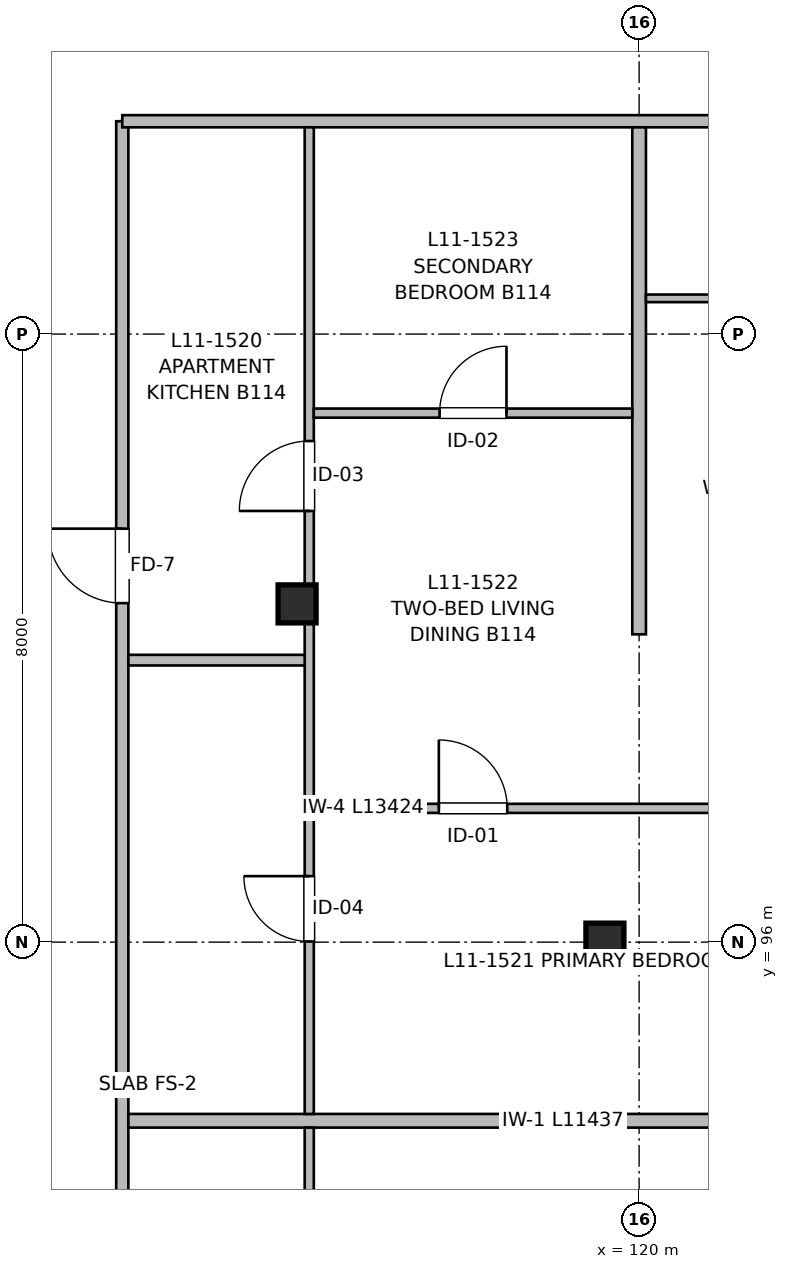
"""IFC4 building model, lengths in metres.
Left out: names, types, materials, properties, quantities, classifications, styles, units other than length and angle.
Written with IfcOpenShell. Run it as: python <this file> out.ifc"""

import sys

from ifc_helpers import new_model, si_unit, direction, frame, frame_2d, origin, origin_2d, place, context, subcontext, project, spatial, rectangle, extrude, element, fill, save


model = new_model("IFC4")
c1 = context("Model", 3, precision=1e-05, world=origin(), true_north=direction((0.0, 1.0)))
c2 = subcontext(c1, "Body", "Model", "MODEL_VIEW")
j1 = project(units=[si_unit("LENGTHUNIT", "METRE"), si_unit("PLANEANGLEUNIT", "RADIAN")], contexts=[c1])
p1 = place(None, origin())
s1 = spatial("IfcSite", under=j1, at=p1, CompositionType="ELEMENT")
p2 = place(p1, origin())
s2 = spatial("IfcBuilding", under=s1, at=p2, CompositionType="ELEMENT")
p3 = place(p2, frame((0.0, 0.0, 36.16)))
s3 = spatial("IfcBuildingStorey", under=s2, at=p3, CompositionType="ELEMENT", Elevation=36.16)
for number, where, z_axis, x_axis in (
    (1, (115.5, 100.45, 0.0), (0.0, 0.0, 1.0), (1.0, 0.0, 0.0)),
    (2, (119.55, 96.0, 0.0), (0.0, 0.0, 1.0), (1.0, 0.0, 0.0)),
):
    element("IfcColumn", number, at=place(p3, frame(where, z_axis=z_axis, x_axis=x_axis)), inside=s3, PredefinedType="COLUMN", context=c2, shape_type="SweptSolid", body=[
        extrude(rectangle(XDim=0.5, YDim=0.5, at=origin_2d()), origin(), (0.0, 0.0, 1.0), 3.2),
    ])
p4 = place(p3, frame((113.2, 64.56, 0.0), z_axis=(0.0, 0.0, 1.0), x_axis=(0.0, 1.0, 0.0)))
e3 = element("IfcWall", 3, at=p4, inside=s3, PredefinedType="PARTITIONING", context=c2, shape_type="SweptSolid", body=[
    extrude(rectangle(XDim=42.24, YDim=0.16, at=frame_2d((21.12, 0.0))), origin(), (0.0, 0.0, 1.0), 2.935),
])
p5 = place(p4, frame((4.78, 0.0, 0.0)))
e4 = element("IfcOpeningElement", 4, at=p5, cuts=e3, PredefinedType="OPENING", context=c2, shape_type="SweptSolid", body=[
    extrude(rectangle(XDim=0.98, YDim=2.15, at=frame_2d((0.49, 1.075))), frame((0.0, 0.09, 0.0), z_axis=(0.0, -1.0, 0.0), x_axis=(1.0, 0.0, 0.0)), (0.0, 0.0, 1.0), 0.18),
])
p6 = place(p4, frame((13.88, 0.0, 0.0)))
e5 = element("IfcOpeningElement", 5, at=p6, cuts=e3, PredefinedType="OPENING", context=c2, shape_type="SweptSolid", body=[
    extrude(rectangle(XDim=1.02, YDim=2.15, at=frame_2d((0.51, 1.075))), frame((0.0, 0.09, 0.0), z_axis=(0.0, -1.0, 0.0), x_axis=(1.0, 0.0, 0.0)), (0.0, 0.0, 1.0), 0.18),
])
p7 = place(p4, frame((23.93, 0.0, 0.0)))
e6 = element("IfcOpeningElement", 6, at=p7, cuts=e3, PredefinedType="OPENING", context=c2, shape_type="SweptSolid", body=[
    extrude(rectangle(XDim=0.98, YDim=2.15, at=frame_2d((0.49, 1.075))), frame((0.0, 0.09, 0.0), z_axis=(0.0, -1.0, 0.0), x_axis=(1.0, 0.0, 0.0)), (0.0, 0.0, 1.0), 0.18),
])
p8 = place(p4, frame((35.9, 0.0, 0.0)))
e7 = element("IfcOpeningElement", 7, at=p8, cuts=e3, PredefinedType="OPENING", context=c2, shape_type="SweptSolid", body=[
    extrude(rectangle(XDim=0.98, YDim=2.15, at=frame_2d((0.49, 1.075))), frame((0.0, 0.09, 0.0), z_axis=(0.0, -1.0, 0.0), x_axis=(1.0, 0.0, 0.0)), (0.0, 0.0, 1.0), 0.18),
])
p9 = place(p3, frame((113.2, 106.8, 0.0), z_axis=(0.0, 0.0, 1.0), x_axis=(1.0, 0.0, 0.0)))
e8 = element("IfcWall", 8, at=p9, inside=s3, PredefinedType="PARTITIONING", context=c2, shape_type="SweptSolid", body=[
    extrude(rectangle(XDim=24.14, YDim=0.16, at=frame_2d((12.07, 0.0))), origin(), (0.0, 0.0, 1.0), 2.935),
])
p10 = place(p9, frame((19.575, 0.0, 0.0)))
e9 = element("IfcOpeningElement", 9, at=p10, cuts=e8, PredefinedType="OPENING", context=c2, shape_type="SweptSolid", body=[
    extrude(rectangle(XDim=1.05, YDim=2.15, at=frame_2d((0.525, 1.075))), frame((0.0, 0.09, 0.0), z_axis=(0.0, -1.0, 0.0), x_axis=(1.0, 0.0, 0.0)), (0.0, 0.0, 1.0), 0.18),
])
p11 = place(p9, frame((8.995, 0.0, 0.0)))
e10 = element("IfcOpeningElement", 10, at=p11, cuts=e8, PredefinedType="OPENING", context=c2, shape_type="SweptSolid", body=[
    extrude(rectangle(XDim=0.98, YDim=2.15, at=frame_2d((0.49, 1.075))), frame((0.0, 0.09, 0.0), z_axis=(0.0, -1.0, 0.0), x_axis=(1.0, 0.0, 0.0)), (0.0, 0.0, 1.0), 0.18),
])
p12 = place(p3, frame((120.0, 100.05, 0.0), z_axis=(0.0, 0.0, 1.0), x_axis=(0.0, 1.0, 0.0)))
e11 = element("IfcWall", 11, at=p12, inside=s3, PredefinedType="PARTITIONING", context=c2, shape_type="SweptSolid", body=[
    extrude(rectangle(XDim=6.67, YDim=0.18, at=frame_2d((3.335, 0.0))), origin(), (0.0, 0.0, 1.0), 2.935),
])
p13 = place(p3, frame((113.28, 93.65, 0.0), z_axis=(0.0, 0.0, 1.0), x_axis=(1.0, 0.0, 0.0)))
e12 = element("IfcWall", 12, at=p13, inside=s3, PredefinedType="PARTITIONING", context=c2, shape_type="SweptSolid", body=[
    extrude(rectangle(XDim=11.437, YDim=0.18, at=frame_2d((5.719, 0.0))), origin(), (0.0, 0.0, 1.0), 2.935),
])
p14 = place(p3, frame((115.66, 82.78, 0.0), z_axis=(0.0, 0.0, 1.0), x_axis=(0.0, 1.0, 0.0)))
e13 = element("IfcWall", 13, at=p14, inside=s3, PredefinedType="PARTITIONING", context=c2, shape_type="SweptSolid", body=[
    extrude(rectangle(XDim=10.78, YDim=0.12, at=frame_2d((5.39, 0.0))), origin(), (0.0, 0.0, 1.0), 2.935),
])
p15 = place(p14, frame((1.885, 0.0, 0.0)))
e14 = element("IfcOpeningElement", 14, at=p15, cuts=e13, PredefinedType="OPENING", context=c2, shape_type="SweptSolid", body=[
    extrude(rectangle(XDim=0.86, YDim=2.1, at=frame_2d((0.43, 1.05))), frame((0.0, 0.07, 0.0), z_axis=(0.0, -1.0, 0.0), x_axis=(1.0, 0.0, 0.0)), (0.0, 0.0, 1.0), 0.14),
])
p16 = place(p14, frame((6.59, 0.0, 0.0)))
e15 = element("IfcOpeningElement", 15, at=p16, cuts=e13, PredefinedType="OPENING", context=c2, shape_type="SweptSolid", body=[
    extrude(rectangle(XDim=0.92, YDim=2.1, at=frame_2d((0.46, 1.05))), frame((0.0, 0.07, 0.0), z_axis=(0.0, -1.0, 0.0), x_axis=(1.0, 0.0, 0.0)), (0.0, 0.0, 1.0), 0.14),
])
p17 = place(p3, frame((115.66, 93.74, 0.0), z_axis=(0.0, 0.0, 1.0), x_axis=(0.0, 1.0, 0.0)))
e16 = element("IfcWall", 16, at=p17, inside=s3, PredefinedType="PARTITIONING", context=c2, shape_type="SweptSolid", body=[
    extrude(rectangle(XDim=12.98, YDim=0.12, at=frame_2d((6.49, 0.0))), origin(), (0.0, 0.0, 1.0), 2.68),
])
p18 = place(p17, frame((2.269, 0.0, 0.0)))
e17 = element("IfcOpeningElement", 17, at=p18, cuts=e16, PredefinedType="OPENING", context=c2, shape_type="SweptSolid", body=[
    extrude(rectangle(XDim=0.86, YDim=2.1, at=frame_2d((0.43, 1.05))), frame((0.0, 0.07, 0.0), z_axis=(0.0, -1.0, 0.0), x_axis=(1.0, 0.0, 0.0)), (0.0, 0.0, 1.0), 0.14),
])
p19 = place(p17, frame((7.933, 0.0, 0.0)))
e18 = element("IfcOpeningElement", 18, at=p19, cuts=e16, PredefinedType="OPENING", context=c2, shape_type="SweptSolid", body=[
    extrude(rectangle(XDim=0.92, YDim=2.1, at=frame_2d((0.46, 1.05))), frame((0.0, 0.07, 0.0), z_axis=(0.0, -1.0, 0.0), x_axis=(1.0, 0.0, 0.0)), (0.0, 0.0, 1.0), 0.14),
])
p20 = place(p3, frame((113.28, 99.71, 0.0), z_axis=(0.0, 0.0, 1.0), x_axis=(1.0, 0.0, 0.0)))
e19 = element("IfcWall", 19, at=p20, inside=s3, PredefinedType="PARTITIONING", context=c2, shape_type="SweptSolid", body=[
    extrude(rectangle(XDim=2.32, YDim=0.14, at=frame_2d((1.16, 0.0))), origin(), (0.0, 0.0, 1.0), 2.935),
])
p21 = place(p3, frame((115.72, 97.76, 0.0), z_axis=(0.0, 0.0, 1.0), x_axis=(1.0, 0.0, 0.0)))
e20 = element("IfcWall", 20, at=p21, inside=s3, PredefinedType="PARTITIONING", context=c2, shape_type="SweptSolid", body=[
    extrude(rectangle(XDim=13.424, YDim=0.12, at=frame_2d((6.712, 0.0))), origin(), (0.0, 0.0, 1.0), 2.935),
])
p22 = place(p21, frame((1.645, 0.0, 0.0)))
e21 = element("IfcOpeningElement", 21, at=p22, cuts=e20, PredefinedType="OPENING", context=c2, shape_type="SweptSolid", body=[
    extrude(rectangle(XDim=0.9, YDim=2.1, at=frame_2d((0.45, 1.05))), frame((0.0, 0.07, 0.0), z_axis=(0.0, -1.0, 0.0), x_axis=(1.0, 0.0, 0.0)), (0.0, 0.0, 1.0), 0.14),
])
p23 = place(p3, frame((115.72, 102.96, 0.0), z_axis=(0.0, 0.0, 1.0), x_axis=(1.0, 0.0, 0.0)))
e22 = element("IfcWall", 22, at=p23, inside=s3, PredefinedType="PARTITIONING", context=c2, shape_type="SweptSolid", body=[
    extrude(rectangle(XDim=4.19, YDim=0.12, at=frame_2d((2.095, 0.0))), origin(), (0.0, 0.0, 1.0), 2.935),
])
p24 = place(p23, frame((1.655, 0.0, 0.0)))
e23 = element("IfcOpeningElement", 23, at=p24, cuts=e22, PredefinedType="OPENING", context=c2, shape_type="SweptSolid", body=[
    extrude(rectangle(XDim=0.88, YDim=2.1, at=frame_2d((0.44, 1.05))), frame((0.0, 0.07, 0.0), z_axis=(0.0, -1.0, 0.0), x_axis=(1.0, 0.0, 0.0)), (0.0, 0.0, 1.0), 0.14),
])
p25 = place(p3, frame((120.09, 104.47, 0.0), z_axis=(0.0, 0.0, 1.0), x_axis=(1.0, 0.0, 0.0)))
e24 = element("IfcWall", 24, at=p25, inside=s3, PredefinedType="PARTITIONING", context=c2, shape_type="SweptSolid", body=[
    extrude(rectangle(XDim=5.13, YDim=0.1, at=frame_2d((2.565, 0.0))), origin(), (0.0, 0.0, 1.0), 2.935),
])
p26 = place(p25, frame((2.18, 0.0, 0.0)))
e25 = element("IfcOpeningElement", 25, at=p26, cuts=e24, PredefinedType="OPENING", context=c2, shape_type="SweptSolid", body=[
    extrude(rectangle(XDim=0.92, YDim=2.1, at=frame_2d((0.46, 1.05))), frame((0.0, 0.06, 0.0), z_axis=(0.0, -1.0, 0.0), x_axis=(1.0, 0.0, 0.0)), (0.0, 0.0, 1.0), 0.12),
])
p27 = place(p18, origin())
e26 = element("IfcDoor", 26, at=p27, inside=s3, OperationType="SINGLE_SWING_RIGHT", PredefinedType="DOOR", context=c2, shape_type="SweptSolid", body=[
    extrude(rectangle(XDim=0.86, YDim=2.1, at=frame_2d((0.43, 1.05))), frame((0.0, 0.025, 0.0), z_axis=(0.0, -1.0, 0.0), x_axis=(1.0, 0.0, 0.0)), (0.0, 0.0, 1.0), 0.05),
])
fill(e17, e26)
p28 = place(p19, origin())
e27 = element("IfcDoor", 27, at=p28, inside=s3, OperationType="SINGLE_SWING_LEFT", PredefinedType="DOOR", context=c2, shape_type="SweptSolid", body=[
    extrude(rectangle(XDim=0.92, YDim=2.1, at=frame_2d((0.46, 1.05))), frame((0.0, 0.025, 0.0), z_axis=(0.0, -1.0, 0.0), x_axis=(1.0, 0.0, 0.0)), (0.0, 0.0, 1.0), 0.05),
])
fill(e18, e27)
p29 = place(p8, origin())
e28 = element("IfcDoor", 28, at=p29, inside=s3, OperationType="SINGLE_SWING_RIGHT", PredefinedType="DOOR", context=c2, shape_type="SweptSolid", body=[
    extrude(rectangle(XDim=0.98, YDim=2.15, at=frame_2d((0.49, 1.075))), frame((0.0, 0.025, 0.0), z_axis=(0.0, -1.0, 0.0), x_axis=(1.0, 0.0, 0.0)), (0.0, 0.0, 1.0), 0.05),
])
fill(e7, e28)
p30 = place(p22, origin())
e29 = element("IfcDoor", 29, at=p30, inside=s3, OperationType="SINGLE_SWING_LEFT", PredefinedType="DOOR", context=c2, shape_type="SweptSolid", body=[
    extrude(rectangle(XDim=0.9, YDim=2.1, at=frame_2d((0.45, 1.05))), frame((0.0, 0.025, 0.0), z_axis=(0.0, -1.0, 0.0), x_axis=(1.0, 0.0, 0.0)), (0.0, 0.0, 1.0), 0.05),
])
fill(e21, e29)
p31 = place(p24, origin())
e30 = element("IfcDoor", 30, at=p31, inside=s3, OperationType="SINGLE_SWING_RIGHT", PredefinedType="DOOR", context=c2, shape_type="SweptSolid", body=[
    extrude(rectangle(XDim=0.88, YDim=2.1, at=frame_2d((0.44, 1.05))), frame((0.0, 0.025, 0.0), z_axis=(0.0, -1.0, 0.0), x_axis=(1.0, 0.0, 0.0)), (0.0, 0.0, 1.0), 0.05),
])
fill(e23, e30)
save(model, sys.argv[1])
